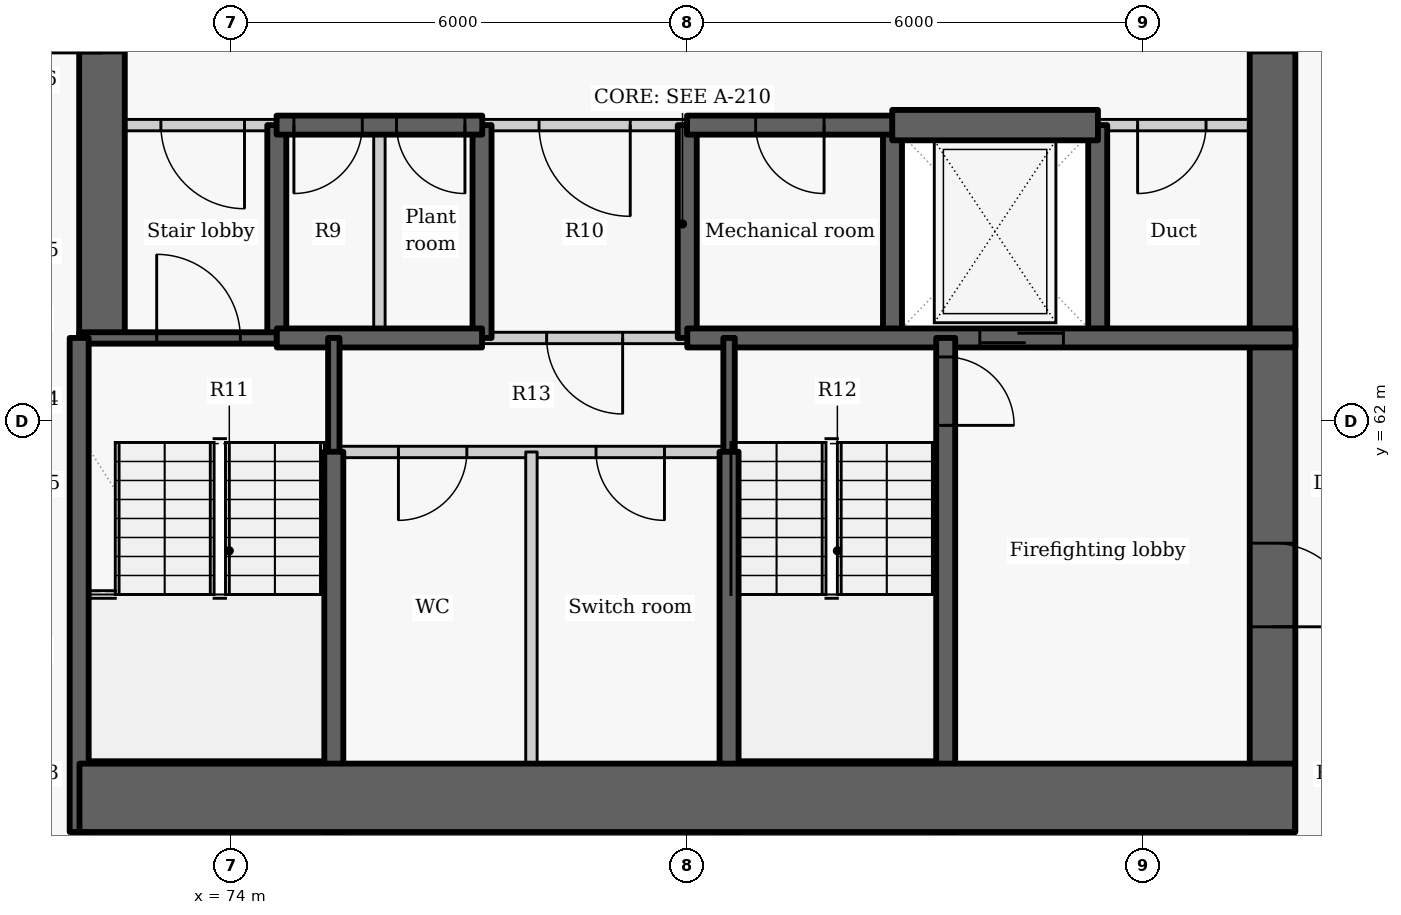
"""IFC4 building model, lengths in metres.
Left out: names, types, materials, properties, quantities, classifications, styles, units other than length and angle.
Written with IfcOpenShell. Run it as: python <this file> out.ifc"""

import sys

from ifc_helpers import new_model, si_unit, direction, frame, frame_2d, origin, place, context, subcontext, project, spatial, rectangle, extrude, element, fill, save


model = new_model("IFC4")
c1 = context("Model", 3, precision=1e-05, world=origin(), true_north=direction((0.0, 1.0)))
c2 = subcontext(c1, "Body", "Model", "MODEL_VIEW")
j1 = project(units=[si_unit("LENGTHUNIT", "METRE"), si_unit("PLANEANGLEUNIT", "RADIAN")], contexts=[c1])
p1 = place(None, origin())
s1 = spatial("IfcSite", under=j1, at=p1, CompositionType="ELEMENT")
p2 = place(p1, origin())
s2 = spatial("IfcBuilding", under=s1, at=p2, CompositionType="ELEMENT")
p3 = place(p2, frame((0.0, 0.0, 38.1)))
s3 = spatial("IfcBuildingStorey", under=s2, at=p3, CompositionType="ELEMENT", Elevation=38.1)
p4 = place(p3, frame((74.6, 63.1, -0.4), z_axis=(0.0, 0.0, 1.0), x_axis=(0.0, 1.0, 0.0)))
e1 = element("IfcWall", 1, at=p4, inside=s3, PredefinedType="SHEAR", context=c2, shape_type="SweptSolid", body=[
    extrude(rectangle(XDim=2.8, YDim=0.25, at=frame_2d((1.4, 0.0))), origin(), (0.0, 0.0, 1.0), 3.425),
])
p5 = place(p3, frame((72.3, 63.1, -0.4), z_axis=(0.0, 0.0, 1.0), x_axis=(0.0, 1.0, 0.0)))
e2 = element("IfcWall", 2, at=p5, inside=s3, PredefinedType="SHEAR", context=c2, shape_type="SweptSolid", body=[
    extrude(rectangle(XDim=9.1, YDim=0.6, at=frame_2d((4.55, 0.0))), origin(), (0.0, 0.0, 1.0), 3.425),
])
p6 = place(p5, frame((3.75, 0.0, 0.4)))
e3 = element("IfcOpeningElement", 3, at=p6, cuts=e2, PredefinedType="OPENING", context=c2, shape_type="SweptSolid", body=[
    extrude(rectangle(XDim=1.5, YDim=2.1, at=frame_2d((0.75, 1.05))), frame((0.0, 0.31, 0.0), z_axis=(0.0, -1.0, 0.0), x_axis=(1.0, 0.0, 0.0)), (0.0, 0.0, 1.0), 0.62),
])
for number, where, z_axis, x_axis in (
    (4, (77.3, 63.1, -0.4), (0.0, 0.0, 1.0), (0.0, 1.0, 0.0)),
    (5, (80.0, 63.1, -0.4), (0.0, 0.0, 1.0), (0.0, 1.0, 0.0)),
    (6, (82.7, 63.1, -0.4), (0.0, 0.0, 1.0), (0.0, 1.0, 0.0)),
    (7, (85.4, 63.1, -0.4), (0.0, 0.0, 1.0), (0.0, 1.0, 0.0)),
):
    element("IfcWall", number, at=place(p3, frame(where, z_axis=z_axis, x_axis=x_axis)), inside=s3, PredefinedType="SHEAR", context=c2, shape_type="SweptSolid", body=[
        extrude(rectangle(XDim=2.8, YDim=0.25, at=frame_2d((1.4, 0.0))), origin(), (0.0, 0.0, 1.0), 3.425),
    ])
p7 = place(p3, frame((87.7, 72.2, -0.4), z_axis=(0.0, 0.0, 1.0), x_axis=(0.0, -1.0, 0.0)))
e8 = element("IfcWall", 8, at=p7, inside=s3, PredefinedType="SHEAR", context=c2, shape_type="SweptSolid", body=[
    extrude(rectangle(XDim=15.6, YDim=0.6, at=frame_2d((7.8, 0.0))), origin(), (0.0, 0.0, 1.0), 3.425),
])
p8 = place(p7, frame((3.85, 0.0, 0.4)))
e9 = element("IfcOpeningElement", 9, at=p8, cuts=e8, PredefinedType="OPENING", context=c2, shape_type="SweptSolid", body=[
    extrude(rectangle(XDim=1.5, YDim=2.1, at=frame_2d((0.75, 1.05))), frame((0.0, 0.31, 0.0), z_axis=(0.0, -1.0, 0.0), x_axis=(1.0, 0.0, 0.0)), (0.0, 0.0, 1.0), 0.62),
])
p9 = place(p7, frame((11.8, 0.0, 0.4)))
e10 = element("IfcOpeningElement", 10, at=p9, cuts=e8, PredefinedType="OPENING", context=c2, shape_type="SweptSolid", body=[
    extrude(rectangle(XDim=1.1, YDim=2.1, at=frame_2d((0.55, 1.05))), frame((0.0, 0.31, 0.0), z_axis=(0.0, -1.0, 0.0), x_axis=(1.0, 0.0, 0.0)), (0.0, 0.0, 1.0), 0.62),
])
p10 = place(p3, frame((74.603, 65.9, 0.0), z_axis=(0.0, 0.0, 1.0), x_axis=(-1.0, 0.0, 0.0)))
e11 = element("IfcWall", 11, at=p10, inside=s3, PredefinedType="PARTITIONING", context=c2, shape_type="SweptSolid", body=[
    extrude(rectangle(XDim=2.603, YDim=0.15, at=frame_2d((1.302, 0.0))), origin(), (0.0, 0.0, 1.0), 3.025),
])
p11 = place(p10, frame((0.428, 0.0, 0.0)))
e12 = element("IfcOpeningElement", 12, at=p11, cuts=e11, PredefinedType="OPENING", context=c2, shape_type="SweptSolid", body=[
    extrude(rectangle(XDim=1.1, YDim=2.1, at=frame_2d((0.55, 1.05))), frame((0.0, 0.085, 0.0), z_axis=(0.0, -1.0, 0.0), x_axis=(1.0, 0.0, 0.0)), (0.0, 0.0, 1.0), 0.17),
])
p12 = place(p3, frame((80.003, 65.9, 0.0), z_axis=(0.0, 0.0, 1.0), x_axis=(-1.0, 0.0, 0.0)))
e13 = element("IfcWall", 13, at=p12, inside=s3, PredefinedType="PARTITIONING", context=c2, shape_type="SweptSolid", body=[
    extrude(rectangle(XDim=2.706, YDim=0.15, at=frame_2d((1.353, 0.0))), origin(), (0.0, 0.0, 1.0), 3.025),
])
p13 = place(p12, frame((0.753, 0.0, 0.0)))
e14 = element("IfcOpeningElement", 14, at=p13, cuts=e13, PredefinedType="OPENING", context=c2, shape_type="SweptSolid", body=[
    extrude(rectangle(XDim=1.2, YDim=2.1, at=frame_2d((0.6, 1.05))), frame((0.0, 0.085, 0.0), z_axis=(0.0, -1.0, 0.0), x_axis=(1.0, 0.0, 0.0)), (0.0, 0.0, 1.0), 0.17),
])
p14 = place(p3, frame((88.0, 65.9, 0.0), z_axis=(0.0, 0.0, 1.0), x_axis=(-1.0, 0.0, 0.0)))
e15 = element("IfcWall", 15, at=p14, inside=s3, PredefinedType="PARTITIONING", context=c2, shape_type="SweptSolid", body=[
    extrude(rectangle(XDim=2.603, YDim=0.15, at=frame_2d((1.302, 0.0))), origin(), (0.0, 0.0, 1.0), 3.025),
])
p15 = place(p14, frame((1.175, 0.0, 0.0)))
e16 = element("IfcOpeningElement", 16, at=p15, cuts=e15, PredefinedType="OPENING", context=c2, shape_type="SweptSolid", body=[
    extrude(rectangle(XDim=0.9, YDim=2.1, at=frame_2d((0.45, 1.05))), frame((0.0, 0.085, 0.0), z_axis=(0.0, -1.0, 0.0), x_axis=(1.0, 0.0, 0.0)), (0.0, 0.0, 1.0), 0.17),
])
p16 = place(p3, frame((77.303, 65.9, -0.4), z_axis=(0.0, 0.0, 1.0), x_axis=(-1.0, 0.0, 0.0)))
e17 = element("IfcWall", 17, at=p16, inside=s3, PredefinedType="SHEAR", context=c2, shape_type="SweptSolid", body=[
    extrude(rectangle(XDim=2.706, YDim=0.25, at=frame_2d((1.353, 0.0))), origin(), (0.0, 0.0, 1.0), 3.425),
])
p17 = place(p16, frame((1.578, 0.0, 0.4)))
e18 = element("IfcOpeningElement", 18, at=p17, cuts=e17, PredefinedType="OPENING", context=c2, shape_type="SweptSolid", body=[
    extrude(rectangle(XDim=0.9, YDim=2.1, at=frame_2d((0.45, 1.05))), frame((0.0, 0.135, 0.0), z_axis=(0.0, -1.0, 0.0), x_axis=(1.0, 0.0, 0.0)), (0.0, 0.0, 1.0), 0.27),
])
p18 = place(p16, frame((0.228, 0.0, 0.4)))
e19 = element("IfcOpeningElement", 19, at=p18, cuts=e17, PredefinedType="OPENING", context=c2, shape_type="SweptSolid", body=[
    extrude(rectangle(XDim=0.9, YDim=2.1, at=frame_2d((0.45, 1.05))), frame((0.0, 0.135, 0.0), z_axis=(0.0, -1.0, 0.0), x_axis=(1.0, 0.0, 0.0)), (0.0, 0.0, 1.0), 0.27),
])
p19 = place(p3, frame((82.703, 65.9, -0.4), z_axis=(0.0, 0.0, 1.0), x_axis=(-1.0, 0.0, 0.0)))
e20 = element("IfcWall", 20, at=p19, inside=s3, PredefinedType="SHEAR", context=c2, shape_type="SweptSolid", body=[
    extrude(rectangle(XDim=2.706, YDim=0.25, at=frame_2d((1.353, 0.0))), origin(), (0.0, 0.0, 1.0), 3.425),
])
p20 = place(p19, frame((0.903, 0.0, 0.4)))
e21 = element("IfcOpeningElement", 21, at=p20, cuts=e20, PredefinedType="OPENING", context=c2, shape_type="SweptSolid", body=[
    extrude(rectangle(XDim=0.9, YDim=2.1, at=frame_2d((0.45, 1.05))), frame((0.0, 0.135, 0.0), z_axis=(0.0, -1.0, 0.0), x_axis=(1.0, 0.0, 0.0)), (0.0, 0.0, 1.0), 0.27),
])
p21 = place(p3, frame((82.697, 65.9, -0.4), z_axis=(0.0, 0.0, 1.0), x_axis=(1.0, 0.0, 0.0)))
e22 = element("IfcWall", 22, at=p21, inside=s3, PredefinedType="SHEAR", context=c2, shape_type="SweptSolid", body=[
    extrude(rectangle(XDim=2.706, YDim=0.4, at=frame_2d((1.353, 0.0))), origin(), (0.0, 0.0, 1.0), 3.425),
])
p22 = place(p3, frame((72.0, 63.1, -0.4), z_axis=(0.0, 0.0, 1.0), x_axis=(1.0, 0.0, 0.0)))
e23 = element("IfcWall", 23, at=p22, inside=s3, PredefinedType="SHEAR", context=c2, shape_type="SweptSolid", body=[
    extrude(rectangle(XDim=2.6, YDim=0.15, at=frame_2d((1.3, 0.0))), origin(), (0.0, 0.0, 1.0), 3.425),
])
p23 = place(p22, frame((1.02, 0.0, 0.4)))
e24 = element("IfcOpeningElement", 24, at=p23, cuts=e23, PredefinedType="OPENING", context=c2, shape_type="SweptSolid", body=[
    extrude(rectangle(XDim=1.1, YDim=2.1, at=frame_2d((0.55, 1.05))), frame((0.0, 0.085, 0.0), z_axis=(0.0, -1.0, 0.0), x_axis=(1.0, 0.0, 0.0)), (0.0, 0.0, 1.0), 0.17),
])
p24 = place(p3, frame((75.95, 63.1, 0.0), z_axis=(0.0, 0.0, 1.0), x_axis=(0.0, 1.0, 0.0)))
e25 = element("IfcWall", 25, at=p24, inside=s3, PredefinedType="PARTITIONING", context=c2, shape_type="SweptSolid", body=[
    extrude(rectangle(XDim=2.8, YDim=0.15, at=frame_2d((1.4, 0.0))), origin(), (0.0, 0.0, 1.0), 3.025),
])
p25 = place(p3, frame((74.6, 63.1, -0.4), z_axis=(0.0, 0.0, 1.0), x_axis=(1.0, 0.0, 0.0)))
e26 = element("IfcWall", 26, at=p25, inside=s3, PredefinedType="SHEAR", context=c2, shape_type="SweptSolid", body=[
    extrude(rectangle(XDim=2.7, YDim=0.25, at=frame_2d((1.35, 0.0))), origin(), (0.0, 0.0, 1.0), 3.425),
])
p26 = place(p3, frame((80.0, 63.1, -0.4), z_axis=(0.0, 0.0, 1.0), x_axis=(1.0, 0.0, 0.0)))
e27 = element("IfcWall", 27, at=p26, inside=s3, PredefinedType="SHEAR", context=c2, shape_type="SweptSolid", body=[
    extrude(rectangle(XDim=8.0, YDim=0.25, at=frame_2d((4.0, 0.0))), origin(), (0.0, 0.0, 1.0), 3.425),
])
p27 = place(p26, frame((3.849, 0.0, 0.4)))
e28 = element("IfcOpeningElement", 28, at=p27, cuts=e27, PredefinedType="OPENING", context=c2, shape_type="SweptSolid", body=[
    extrude(rectangle(XDim=1.1, YDim=2.1, at=frame_2d((0.55, 1.05))), frame((0.0, 0.135, 0.0), z_axis=(0.0, -1.0, 0.0), x_axis=(1.0, 0.0, 0.0)), (0.0, 0.0, 1.0), 0.27),
])
p28 = place(p3, frame((80.0, 63.1, 0.0), z_axis=(0.0, 0.0, 1.0), x_axis=(-1.0, 0.0, 0.0)))
e29 = element("IfcWall", 29, at=p28, inside=s3, PredefinedType="PARTITIONING", context=c2, shape_type="SweptSolid", body=[
    extrude(rectangle(XDim=2.7, YDim=0.15, at=frame_2d((1.35, 0.0))), origin(), (0.0, 0.0, 1.0), 3.025),
])
p29 = place(p28, frame((0.85, 0.0, 0.0)))
e30 = element("IfcOpeningElement", 30, at=p29, cuts=e29, PredefinedType="OPENING", context=c2, shape_type="SweptSolid", body=[
    extrude(rectangle(XDim=1.0, YDim=2.1, at=frame_2d((0.5, 1.05))), frame((0.0, 0.085, 0.0), z_axis=(0.0, -1.0, 0.0), x_axis=(1.0, 0.0, 0.0)), (0.0, 0.0, 1.0), 0.17),
])
p30 = place(p3, frame((75.35, 61.597, -0.4), z_axis=(0.0, 0.0, 1.0), x_axis=(0.0, 1.0, 0.0)))
e31 = element("IfcWall", 31, at=p30, inside=s3, PredefinedType="SHEAR", context=c2, shape_type="SweptSolid", body=[
    extrude(rectangle(XDim=1.503, YDim=0.15, at=frame_2d((0.751, 0.0))), origin(), (0.0, 0.0, 1.0), 3.425),
])
p31 = place(p3, frame((75.35, 56.6, -0.4), z_axis=(0.0, 0.0, 1.0), x_axis=(0.0, 1.0, 0.0)))
e32 = element("IfcWall", 32, at=p31, inside=s3, PredefinedType="SHEAR", context=c2, shape_type="SweptSolid", body=[
    extrude(rectangle(XDim=5.003, YDim=0.25, at=frame_2d((2.501, 0.0))), origin(), (0.0, 0.0, 1.0), 3.425),
])
p32 = place(p3, frame((72.0, 56.6, -0.4), z_axis=(0.0, 0.0, 1.0), x_axis=(0.0, 1.0, 0.0)))
e33 = element("IfcWall", 33, at=p32, inside=s3, PredefinedType="SHEAR", context=c2, shape_type="SweptSolid", body=[
    extrude(rectangle(XDim=6.5, YDim=0.25, at=frame_2d((3.25, 0.0))), origin(), (0.0, 0.0, 1.0), 3.425),
])
p33 = place(p3, frame((83.4, 63.1, -0.4), z_axis=(0.0, 0.0, 1.0), x_axis=(0.0, -1.0, 0.0)))
e34 = element("IfcWall", 34, at=p33, inside=s3, PredefinedType="SHEAR", context=c2, shape_type="SweptSolid", body=[
    extrude(rectangle(XDim=6.5, YDim=0.25, at=frame_2d((3.25, 0.0))), origin(), (0.0, 0.0, 1.0), 3.425),
])
p34 = place(p33, frame((0.25, 0.0, 0.4)))
e35 = element("IfcOpeningElement", 35, at=p34, cuts=e34, PredefinedType="OPENING", context=c2, shape_type="SweptSolid", body=[
    extrude(rectangle(XDim=0.9, YDim=2.1, at=frame_2d((0.45, 1.05))), frame((0.0, 0.135, 0.0), z_axis=(0.0, -1.0, 0.0), x_axis=(1.0, 0.0, 0.0)), (0.0, 0.0, 1.0), 0.27),
])
p35 = place(p3, frame((80.55, 61.597, -0.4), z_axis=(0.0, 0.0, 1.0), x_axis=(0.0, 1.0, 0.0)))
e36 = element("IfcWall", 36, at=p35, inside=s3, PredefinedType="SHEAR", context=c2, shape_type="SweptSolid", body=[
    extrude(rectangle(XDim=1.503, YDim=0.15, at=frame_2d((0.751, 0.0))), origin(), (0.0, 0.0, 1.0), 3.425),
])
p36 = place(p3, frame((80.55, 56.6, -0.4), z_axis=(0.0, 0.0, 1.0), x_axis=(0.0, 1.0, 0.0)))
e37 = element("IfcWall", 37, at=p36, inside=s3, PredefinedType="SHEAR", context=c2, shape_type="SweptSolid", body=[
    extrude(rectangle(XDim=5.003, YDim=0.25, at=frame_2d((2.501, 0.0))), origin(), (0.0, 0.0, 1.0), 3.425),
])
p37 = place(p3, frame((80.55, 61.6, 0.0), z_axis=(0.0, 0.0, 1.0), x_axis=(-1.0, 0.0, 0.0)))
e38 = element("IfcWall", 38, at=p37, inside=s3, PredefinedType="PARTITIONING", context=c2, shape_type="SweptSolid", body=[
    extrude(rectangle(XDim=5.2, YDim=0.15, at=frame_2d((2.6, 0.0))), origin(), (0.0, 0.0, 1.0), 3.025),
])
p38 = place(p37, frame((3.45, 0.0, 0.0)))
e39 = element("IfcOpeningElement", 39, at=p38, cuts=e38, PredefinedType="OPENING", context=c2, shape_type="SweptSolid", body=[
    extrude(rectangle(XDim=0.9, YDim=2.1, at=frame_2d((0.45, 1.05))), frame((0.0, 0.085, 0.0), z_axis=(0.0, -1.0, 0.0), x_axis=(1.0, 0.0, 0.0)), (0.0, 0.0, 1.0), 0.17),
])
p39 = place(p37, frame((0.85, 0.0, 0.0)))
e40 = element("IfcOpeningElement", 40, at=p39, cuts=e38, PredefinedType="OPENING", context=c2, shape_type="SweptSolid", body=[
    extrude(rectangle(XDim=0.9, YDim=2.1, at=frame_2d((0.45, 1.05))), frame((0.0, 0.085, 0.0), z_axis=(0.0, -1.0, 0.0), x_axis=(1.0, 0.0, 0.0)), (0.0, 0.0, 1.0), 0.17),
])
p40 = place(p3, frame((77.95, 56.6, 0.0), z_axis=(0.0, 0.0, 1.0), x_axis=(0.0, 1.0, 0.0)))
e41 = element("IfcWall", 41, at=p40, inside=s3, PredefinedType="PARTITIONING", context=c2, shape_type="SweptSolid", body=[
    extrude(rectangle(XDim=5.0, YDim=0.15, at=frame_2d((2.5, 0.0))), origin(), (0.0, 0.0, 1.0), 3.025),
])
p41 = place(p3, frame((72.004, 57.05, -0.4), z_axis=(0.0, 0.0, 1.0), x_axis=(1.0, 0.0, 0.0)))
e42 = element("IfcWall", 42, at=p41, inside=s3, PredefinedType="SHEAR", context=c2, shape_type="SweptSolid", body=[
    extrude(rectangle(XDim=15.992, YDim=0.9, at=frame_2d((7.996, 0.0))), origin(), (0.0, 0.0, 1.0), 3.425),
])
p42 = place(p11, origin())
e43 = element("IfcDoor", 43, at=p42, inside=s3, OperationType="SINGLE_SWING_LEFT", PredefinedType="DOOR", context=c2, shape_type="SweptSolid", body=[
    extrude(rectangle(XDim=1.1, YDim=2.1, at=frame_2d((0.55, 1.05))), frame((0.0, 0.025, 0.0), z_axis=(0.0, -1.0, 0.0), x_axis=(1.0, 0.0, 0.0)), (0.0, 0.0, 1.0), 0.05),
])
fill(e12, e43)
p43 = place(p17, origin())
e44 = element("IfcDoor", 44, at=p43, inside=s3, OperationType="SINGLE_SWING_RIGHT", PredefinedType="DOOR", context=c2, shape_type="SweptSolid", body=[
    extrude(rectangle(XDim=0.9, YDim=2.1, at=frame_2d((0.45, 1.05))), frame((0.0, 0.025, 0.0), z_axis=(0.0, -1.0, 0.0), x_axis=(1.0, 0.0, 0.0)), (0.0, 0.0, 1.0), 0.05),
])
fill(e18, e44)
p44 = place(p18, origin())
e45 = element("IfcDoor", 45, at=p44, inside=s3, OperationType="SINGLE_SWING_LEFT", PredefinedType="DOOR", context=c2, shape_type="SweptSolid", body=[
    extrude(rectangle(XDim=0.9, YDim=2.1, at=frame_2d((0.45, 1.05))), frame((0.0, 0.025, 0.0), z_axis=(0.0, -1.0, 0.0), x_axis=(1.0, 0.0, 0.0)), (0.0, 0.0, 1.0), 0.05),
])
fill(e19, e45)
p45 = place(p13, origin())
e46 = element("IfcDoor", 46, at=p45, inside=s3, OperationType="DOUBLE_DOOR_SINGLE_SWING", PredefinedType="DOOR", context=c2, shape_type="SweptSolid", body=[
    extrude(rectangle(XDim=1.2, YDim=2.1, at=frame_2d((0.6, 1.05))), frame((0.0, 0.025, 0.0), z_axis=(0.0, -1.0, 0.0), x_axis=(1.0, 0.0, 0.0)), (0.0, 0.0, 1.0), 0.05),
])
fill(e14, e46)
p46 = place(p20, origin())
e47 = element("IfcDoor", 47, at=p46, inside=s3, OperationType="SINGLE_SWING_LEFT", PredefinedType="DOOR", context=c2, shape_type="SweptSolid", body=[
    extrude(rectangle(XDim=0.9, YDim=2.1, at=frame_2d((0.45, 1.05))), frame((0.0, 0.025, 0.0), z_axis=(0.0, -1.0, 0.0), x_axis=(1.0, 0.0, 0.0)), (0.0, 0.0, 1.0), 0.05),
])
fill(e21, e47)
p47 = place(p27, origin())
e48 = element("IfcDoor", 48, at=p47, inside=s3, OperationType="SLIDING_TO_LEFT", PredefinedType="DOOR", context=c2, shape_type="SweptSolid", body=[
    extrude(rectangle(XDim=1.1, YDim=2.1, at=frame_2d((0.55, 1.05))), frame((0.0, 0.025, 0.0), z_axis=(0.0, -1.0, 0.0), x_axis=(1.0, 0.0, 0.0)), (0.0, 0.0, 1.0), 0.05),
])
fill(e28, e48)
p48 = place(p15, origin())
e49 = element("IfcDoor", 49, at=p48, inside=s3, OperationType="SINGLE_SWING_RIGHT", PredefinedType="DOOR", context=c2, shape_type="SweptSolid", body=[
    extrude(rectangle(XDim=0.9, YDim=2.1, at=frame_2d((0.45, 1.05))), frame((0.0, 0.025, 0.0), z_axis=(0.0, -1.0, 0.0), x_axis=(1.0, 0.0, 0.0)), (0.0, 0.0, 1.0), 0.05),
])
fill(e16, e49)
p49 = place(p29, origin())
e50 = element("IfcDoor", 50, at=p49, inside=s3, OperationType="SINGLE_SWING_LEFT", PredefinedType="DOOR", context=c2, shape_type="SweptSolid", body=[
    extrude(rectangle(XDim=1.0, YDim=2.1, at=frame_2d((0.5, 1.05))), frame((0.0, 0.025, 0.0), z_axis=(0.0, -1.0, 0.0), x_axis=(1.0, 0.0, 0.0)), (0.0, 0.0, 1.0), 0.05),
])
fill(e30, e50)
p50 = place(p38, origin())
e51 = element("IfcDoor", 51, at=p50, inside=s3, OperationType="SINGLE_SWING_RIGHT", PredefinedType="DOOR", context=c2, shape_type="SweptSolid", body=[
    extrude(rectangle(XDim=0.9, YDim=2.1, at=frame_2d((0.45, 1.05))), frame((0.0, 0.025, 0.0), z_axis=(0.0, -1.0, 0.0), x_axis=(1.0, 0.0, 0.0)), (0.0, 0.0, 1.0), 0.05),
])
fill(e39, e51)
p51 = place(p39, origin())
e52 = element("IfcDoor", 52, at=p51, inside=s3, OperationType="SINGLE_SWING_LEFT", PredefinedType="DOOR", context=c2, shape_type="SweptSolid", body=[
    extrude(rectangle(XDim=0.9, YDim=2.1, at=frame_2d((0.45, 1.05))), frame((0.0, 0.025, 0.0), z_axis=(0.0, -1.0, 0.0), x_axis=(1.0, 0.0, 0.0)), (0.0, 0.0, 1.0), 0.05),
])
fill(e40, e52)
p52 = place(p23, origin())
e53 = element("IfcDoor", 53, at=p52, inside=s3, OperationType="SINGLE_SWING_LEFT", PredefinedType="DOOR", context=c2, shape_type="SweptSolid", body=[
    extrude(rectangle(XDim=1.1, YDim=2.1, at=frame_2d((0.55, 1.05))), frame((0.0, 0.025, 0.0), z_axis=(0.0, -1.0, 0.0), x_axis=(1.0, 0.0, 0.0)), (0.0, 0.0, 1.0), 0.05),
])
fill(e24, e53)
p53 = place(p34, origin())
e54 = element("IfcDoor", 54, at=p53, inside=s3, OperationType="SINGLE_SWING_RIGHT", PredefinedType="DOOR", context=c2, shape_type="SweptSolid", body=[
    extrude(rectangle(XDim=0.9, YDim=2.1, at=frame_2d((0.45, 1.05))), frame((0.0, 0.025, 0.0), z_axis=(0.0, -1.0, 0.0), x_axis=(1.0, 0.0, 0.0)), (0.0, 0.0, 1.0), 0.05),
])
fill(e35, e54)
p54 = place(p8, origin())
e55 = element("IfcDoor", 55, at=p54, inside=s3, OperationType="DOUBLE_DOOR_SINGLE_SWING", PredefinedType="DOOR", context=c2, shape_type="SweptSolid", body=[
    extrude(rectangle(XDim=1.5, YDim=2.1, at=frame_2d((0.75, 1.05))), frame((0.0, 0.025, 0.0), z_axis=(0.0, -1.0, 0.0), x_axis=(1.0, 0.0, 0.0)), (0.0, 0.0, 1.0), 0.05),
])
fill(e9, e55)
p55 = place(p9, origin())
e56 = element("IfcDoor", 56, at=p55, inside=s3, OperationType="SINGLE_SWING_RIGHT", PredefinedType="DOOR", context=c2, shape_type="SweptSolid", body=[
    extrude(rectangle(XDim=1.1, YDim=2.1, at=frame_2d((0.55, 1.05))), frame((0.0, 0.025, 0.0), z_axis=(0.0, -1.0, 0.0), x_axis=(1.0, 0.0, 0.0)), (0.0, 0.0, 1.0), 0.05),
])
fill(e10, e56)
save(model, sys.argv[1])
